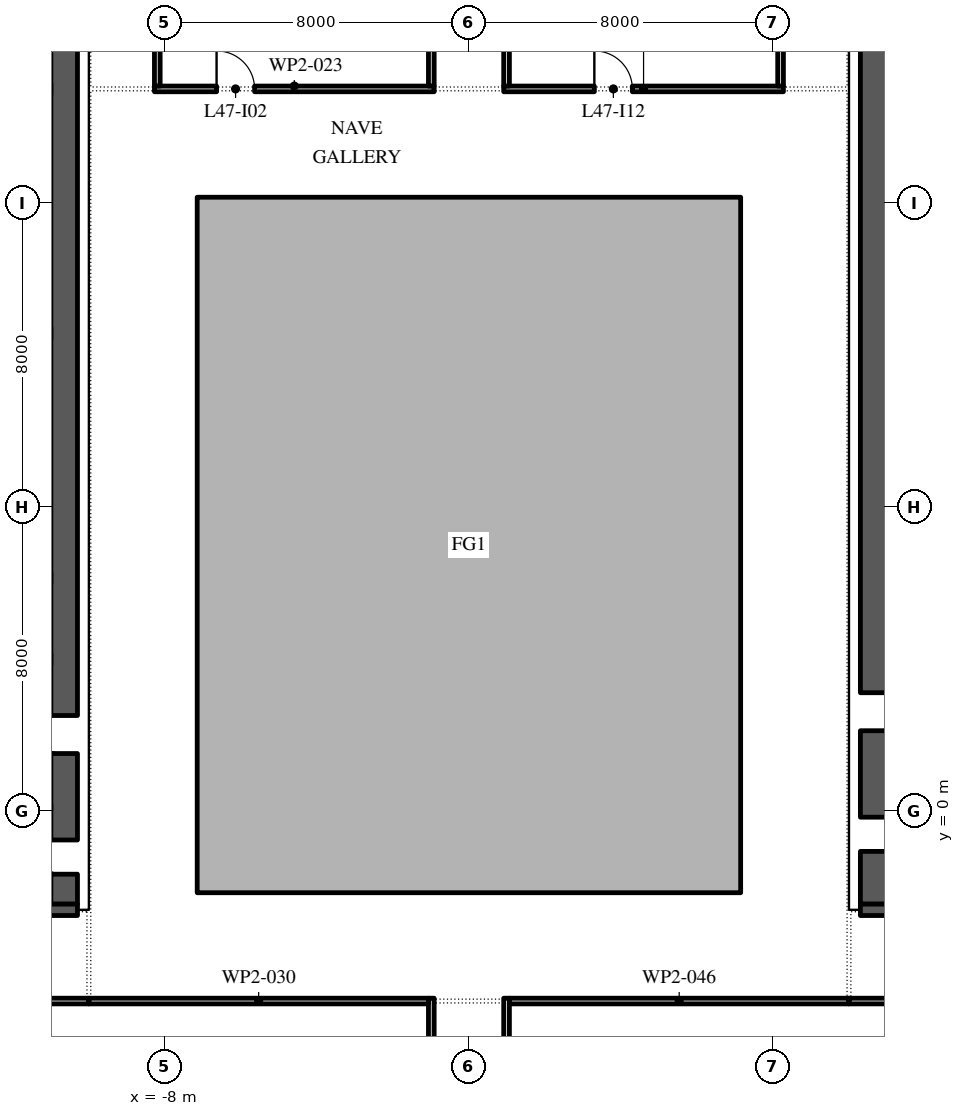
"""IFC4 building model, lengths in metres.
Left out: names, types, materials, properties, quantities, classifications, styles, units other than length and angle.
Written with IfcOpenShell. Run it as: python <this file> out.ifc"""

import sys

from ifc_helpers import new_model, si_unit, direction, frame, frame_2d, origin, place, context, subcontext, project, spatial, polyline, rectangle, outline, extrude, element, fill, save


model = new_model("IFC4")
c1 = context("Model", 3, precision=1e-05, world=origin(), true_north=direction((0.0, 1.0)))
c2 = subcontext(c1, "Body", "Model", "MODEL_VIEW")
j1 = project(units=[si_unit("LENGTHUNIT", "METRE"), si_unit("PLANEANGLEUNIT", "RADIAN")], contexts=[c1])
p1 = place(None, origin())
s1 = spatial("IfcSite", under=j1, at=p1, CompositionType="ELEMENT")
p2 = place(p1, origin())
s2 = spatial("IfcBuilding", under=s1, at=p2, CompositionType="ELEMENT")
p3 = place(p2, frame((0.0, 0.0, 213.6)))
s3 = spatial("IfcBuildingStorey", under=s2, at=p3, CompositionType="ELEMENT", Elevation=213.6)
p4 = place(p3, origin())
e1 = element("IfcWall", 1, at=p4, inside=s3, PredefinedType="STANDARD", context=c2, shape_type="SweptSolid", body=[
    extrude(outline(polyline([(-7.15, -2.15), (7.15, -2.15), (7.15, 16.15), (-7.15, 16.15), (-7.15, -2.15)]), holes=[polyline([(-7.0, -2.0), (-7.0, 16.0), (7.0, 16.0), (7.0, -2.0), (-7.0, -2.0)])]), origin(), (0.0, 0.0, 1.0), 4.0),
])
p5 = place(p3, frame((-10.65, -2.45, 0.0), z_axis=(0.0, 0.0, 1.0), x_axis=(0.0, 1.0, 0.0)))
e2 = element("IfcWall", 2, at=p5, inside=s3, PredefinedType="SHEAR", context=c2, shape_type="SweptSolid", body=[
    extrude(rectangle(XDim=27.9, YDim=0.7, at=frame_2d((13.95, 0.0))), origin(), (0.0, 0.0, 1.0), 4.0),
])
p6 = place(p5, frame((23.65, 0.0, 0.0)))
e3 = element("IfcOpeningElement", 3, at=p6, cuts=e2, PredefinedType="OPENING", context=c2, shape_type="SweptSolid", body=[
    extrude(rectangle(XDim=2.4, YDim=2.1, at=frame_2d((1.2, 1.05))), frame((0.0, 0.36, 0.0), z_axis=(0.0, -1.0, 0.0), x_axis=(1.0, 0.0, 0.0)), (0.0, 0.0, 1.0), 0.72),
])
p7 = place(p5, frame((0.788, 0.0, 0.0)))
e4 = element("IfcOpeningElement", 4, at=p7, cuts=e2, PredefinedType="OPENING", context=c2, shape_type="SweptSolid", body=[
    extrude(rectangle(XDim=0.9, YDim=2.1, at=frame_2d((0.45, 1.05))), frame((0.0, 0.36, 0.0), z_axis=(0.0, -1.0, 0.0), x_axis=(1.0, 0.0, 0.0)), (0.0, 0.0, 1.0), 0.72),
])
p8 = place(p5, frame((3.962, 0.0, 0.0)))
e5 = element("IfcOpeningElement", 5, at=p8, cuts=e2, PredefinedType="OPENING", context=c2, shape_type="SweptSolid", body=[
    extrude(rectangle(XDim=1.0, YDim=2.1, at=frame_2d((0.5, 1.05))), frame((0.0, 0.36, 0.0), z_axis=(0.0, -1.0, 0.0), x_axis=(1.0, 0.0, 0.0)), (0.0, 0.0, 1.0), 0.72),
])
p9 = place(p3, frame((-21.7, -2.6, 0.0), z_axis=(0.0, 0.0, 1.0), x_axis=(1.0, 0.0, 0.0)))
e6 = element("IfcWall", 6, at=p9, inside=s3, PredefinedType="SHEAR", context=c2, shape_type="SweptSolid", body=[
    extrude(rectangle(XDim=11.4, YDim=0.3, at=frame_2d((5.7, 0.0))), origin(), (0.0, 0.0, 1.0), 4.0),
])
p10 = place(p3, frame((10.65, -2.45, 0.0), z_axis=(0.0, 0.0, 1.0), x_axis=(0.0, 1.0, 0.0)))
e7 = element("IfcWall", 7, at=p10, inside=s3, PredefinedType="SHEAR", context=c2, shape_type="SweptSolid", body=[
    extrude(rectangle(XDim=27.9, YDim=0.7, at=frame_2d((13.95, 0.0))), origin(), (0.0, 0.0, 1.0), 4.0),
])
p11 = place(p10, frame((23.65, 0.0, 0.0)))
e8 = element("IfcOpeningElement", 8, at=p11, cuts=e7, PredefinedType="OPENING", context=c2, shape_type="SweptSolid", body=[
    extrude(rectangle(XDim=2.4, YDim=2.1, at=frame_2d((1.2, 1.05))), frame((0.0, 0.36, 0.0), z_axis=(0.0, -1.0, 0.0), x_axis=(1.0, 0.0, 0.0)), (0.0, 0.0, 1.0), 0.72),
])
p12 = place(p10, frame((1.387, 0.0, 0.0)))
e9 = element("IfcOpeningElement", 9, at=p12, cuts=e7, PredefinedType="OPENING", context=c2, shape_type="SweptSolid", body=[
    extrude(rectangle(XDim=0.9, YDim=2.1, at=frame_2d((0.45, 1.05))), frame((0.0, 0.36, 0.0), z_axis=(0.0, -1.0, 0.0), x_axis=(1.0, 0.0, 0.0)), (0.0, 0.0, 1.0), 0.72),
])
p13 = place(p10, frame((4.562, 0.0, 0.0)))
e10 = element("IfcOpeningElement", 10, at=p13, cuts=e7, PredefinedType="OPENING", context=c2, shape_type="SweptSolid", body=[
    extrude(rectangle(XDim=1.0, YDim=2.1, at=frame_2d((0.5, 1.05))), frame((0.0, 0.36, 0.0), z_axis=(0.0, -1.0, 0.0), x_axis=(1.0, 0.0, 0.0)), (0.0, 0.0, 1.0), 0.72),
])
p14 = place(p3, frame((10.3, -2.6, 0.0), z_axis=(0.0, 0.0, 1.0), x_axis=(1.0, 0.0, 0.0)))
e11 = element("IfcWall", 11, at=p14, inside=s3, PredefinedType="SHEAR", context=c2, shape_type="SweptSolid", body=[
    extrude(rectangle(XDim=11.4, YDim=0.3, at=frame_2d((5.7, 0.0))), origin(), (0.0, 0.0, 1.0), 4.0),
])
p15 = place(p3, frame((-10.0, -5.0, 0.0), z_axis=(0.0, 0.0, 1.0), x_axis=(-1.0, 0.0, 0.0)))
e12 = element("IfcWall", 12, at=p15, inside=s3, PredefinedType="PARTITIONING", context=c2, shape_type="SweptSolid", body=[
    extrude(rectangle(XDim=13.715, YDim=0.15, at=frame_2d((6.857, 0.0))), origin(), (0.0, 0.0, 1.0), 4.0),
])
p16 = place(p15, frame((3.64, 0.0, 0.0)))
e13 = element("IfcOpeningElement", 13, at=p16, cuts=e12, PredefinedType="OPENING", context=c2, shape_type="SweptSolid", body=[
    extrude(rectangle(XDim=1.0, YDim=2.1, at=frame_2d((0.5, 1.05))), frame((0.0, 0.085, 0.0), z_axis=(0.0, -1.0, 0.0), x_axis=(1.0, 0.0, 0.0)), (0.0, 0.0, 1.0), 0.17),
])
p17 = place(p3, frame((-8.275, 19.0, 0.0), z_axis=(0.0, 0.0, 1.0), x_axis=(1.0, 0.0, 0.0)))
e14 = element("IfcWall", 14, at=p17, inside=s3, PredefinedType="PARTITIONING", context=c2, shape_type="SweptSolid", body=[
    extrude(rectangle(XDim=7.36, YDim=0.15, at=frame_2d((3.68, 0.0))), origin(), (0.0, 0.0, 1.0), 4.0),
])
p18 = place(p17, frame((1.635, 0.0, 0.0)))
e15 = element("IfcOpeningElement", 15, at=p18, cuts=e14, PredefinedType="OPENING", context=c2, shape_type="SweptSolid", body=[
    extrude(rectangle(XDim=1.0, YDim=2.1, at=frame_2d((0.5, 1.05))), frame((0.0, 0.085, 0.0), z_axis=(0.0, -1.0, 0.0), x_axis=(1.0, 0.0, 0.0)), (0.0, 0.0, 1.0), 0.17),
])
p19 = place(p3, frame((-8.2, 22.31, 0.0), z_axis=(0.0, 0.0, 1.0), x_axis=(0.0, -1.0, 0.0)))
e16 = element("IfcWall", 16, at=p19, inside=s3, PredefinedType="PARTITIONING", context=c2, shape_type="SweptSolid", body=[
    extrude(rectangle(XDim=3.235, YDim=0.15, at=frame_2d((1.618, 0.0))), origin(), (0.0, 0.0, 1.0), 4.0),
])
p20 = place(p3, frame((-0.99, -11.17, 0.0), z_axis=(0.0, 0.0, 1.0), x_axis=(0.0, 1.0, 0.0)))
e17 = element("IfcWall", 17, at=p20, inside=s3, PredefinedType="PARTITIONING", context=c2, shape_type="SweptSolid", body=[
    extrude(rectangle(XDim=6.245, YDim=0.15, at=frame_2d((3.123, 0.0))), origin(), (0.0, 0.0, 1.0), 4.0),
])
p21 = place(p3, frame((-1.065, -5.0, 0.0), z_axis=(0.0, 0.0, 1.0), x_axis=(-1.0, 0.0, 0.0)))
e18 = element("IfcWall", 18, at=p21, inside=s3, PredefinedType="PARTITIONING", context=c2, shape_type="SweptSolid", body=[
    extrude(rectangle(XDim=8.935, YDim=0.15, at=frame_2d((4.468, 0.0))), origin(), (0.0, 0.0, 1.0), 4.0),
])
p22 = place(p3, frame((-0.99, 19.075, 0.0), z_axis=(0.0, 0.0, 1.0), x_axis=(0.0, 1.0, 0.0)))
e19 = element("IfcWall", 19, at=p22, inside=s3, PredefinedType="PARTITIONING", context=c2, shape_type="SweptSolid", body=[
    extrude(rectangle(XDim=3.185, YDim=0.15, at=frame_2d((1.593, 0.0))), origin(), (0.0, 0.0, 1.0), 4.0),
])
p23 = place(p3, frame((0.99, -4.925, 0.0), z_axis=(0.0, 0.0, 1.0), x_axis=(0.0, -1.0, 0.0)))
e20 = element("IfcWall", 20, at=p23, inside=s3, PredefinedType="PARTITIONING", context=c2, shape_type="SweptSolid", body=[
    extrude(rectangle(XDim=11.371, YDim=0.15, at=frame_2d((5.686, 0.0))), origin(), (0.0, 0.0, 1.0), 4.0),
])
p24 = place(p23, frame((2.945, 0.0, 0.0)))
e21 = element("IfcOpeningElement", 21, at=p24, cuts=e20, PredefinedType="OPENING", context=c2, shape_type="SweptSolid", body=[
    extrude(rectangle(XDim=1.0, YDim=2.1, at=frame_2d((0.5, 1.05))), frame((0.0, 0.085, 0.0), z_axis=(0.0, -1.0, 0.0), x_axis=(1.0, 0.0, 0.0)), (0.0, 0.0, 1.0), 0.17),
])
p25 = place(p3, frame((0.915, 19.0, 0.0), z_axis=(0.0, 0.0, 1.0), x_axis=(1.0, 0.0, 0.0)))
e22 = element("IfcWall", 22, at=p25, inside=s3, PredefinedType="PARTITIONING", context=c2, shape_type="SweptSolid", body=[
    extrude(rectangle(XDim=7.36, YDim=0.15, at=frame_2d((3.68, 0.0))), origin(), (0.0, 0.0, 1.0), 4.0),
])
p26 = place(p25, frame((2.385, 0.0, 0.0)))
e23 = element("IfcOpeningElement", 23, at=p26, cuts=e22, PredefinedType="OPENING", context=c2, shape_type="SweptSolid", body=[
    extrude(rectangle(XDim=1.0, YDim=2.1, at=frame_2d((0.5, 1.05))), frame((0.0, 0.085, 0.0), z_axis=(0.0, -1.0, 0.0), x_axis=(1.0, 0.0, 0.0)), (0.0, 0.0, 1.0), 0.17),
])
p27 = place(p3, frame((0.99, 22.31, 0.0), z_axis=(0.0, 0.0, 1.0), x_axis=(0.0, -1.0, 0.0)))
e24 = element("IfcWall", 24, at=p27, inside=s3, PredefinedType="PARTITIONING", context=c2, shape_type="SweptSolid", body=[
    extrude(rectangle(XDim=3.235, YDim=0.15, at=frame_2d((1.618, 0.0))), origin(), (0.0, 0.0, 1.0), 4.0),
])
p28 = place(p3, frame((8.2, 19.075, 0.0), z_axis=(0.0, 0.0, 1.0), x_axis=(0.0, 1.0, 0.0)))
e25 = element("IfcWall", 25, at=p28, inside=s3, PredefinedType="PARTITIONING", context=c2, shape_type="SweptSolid", body=[
    extrude(rectangle(XDim=3.185, YDim=0.15, at=frame_2d((1.593, 0.0))), origin(), (0.0, 0.0, 1.0), 4.0),
])
p29 = place(p3, frame((10.0, -5.0, 0.0), z_axis=(0.0, 0.0, 1.0), x_axis=(-1.0, 0.0, 0.0)))
e26 = element("IfcWall", 26, at=p29, inside=s3, PredefinedType="PARTITIONING", context=c2, shape_type="SweptSolid", body=[
    extrude(rectangle(XDim=8.935, YDim=0.15, at=frame_2d((4.468, 0.0))), origin(), (0.0, 0.0, 1.0), 4.0),
])
p30 = place(p3, frame((14.48, -5.0, 0.0), z_axis=(0.0, 0.0, 1.0), x_axis=(-1.0, 0.0, 0.0)))
e27 = element("IfcWall", 27, at=p30, inside=s3, PredefinedType="PARTITIONING", context=c2, shape_type="SweptSolid", body=[
    extrude(rectangle(XDim=4.48, YDim=0.15, at=frame_2d((2.24, 0.0))), origin(), (0.0, 0.0, 1.0), 4.0),
])
p31 = place(p18, origin())
e28 = element("IfcDoor", 28, at=p31, inside=s3, OperationType="SINGLE_SWING_RIGHT", PredefinedType="DOOR", context=c2, shape_type="SweptSolid", body=[
    extrude(rectangle(XDim=1.0, YDim=2.1, at=frame_2d((0.5, 1.05))), frame((0.0, 0.025, 0.0), z_axis=(0.0, -1.0, 0.0), x_axis=(1.0, 0.0, 0.0)), (0.0, 0.0, 1.0), 0.05),
])
fill(e15, e28)
p32 = place(p26, origin())
e29 = element("IfcDoor", 29, at=p32, inside=s3, OperationType="SINGLE_SWING_RIGHT", PredefinedType="DOOR", context=c2, shape_type="SweptSolid", body=[
    extrude(rectangle(XDim=1.0, YDim=2.1, at=frame_2d((0.5, 1.05))), frame((0.0, 0.025, 0.0), z_axis=(0.0, -1.0, 0.0), x_axis=(1.0, 0.0, 0.0)), (0.0, 0.0, 1.0), 0.05),
])
fill(e23, e29)
save(model, sys.argv[1])
